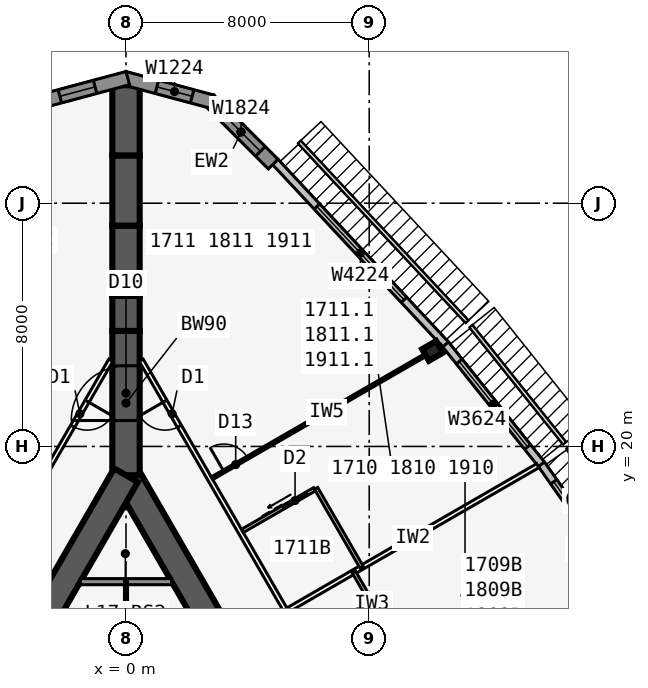
"""IFC4 building model, lengths in metres.
Left out: names, types, materials, properties, quantities, classifications, styles, units other than length and angle.
Written with IfcOpenShell. Run it as: python <this file> out.ifc"""

import sys

from ifc_helpers import new_model, si_unit, direction, frame, frame_2d, origin, origin_2d, place, context, subcontext, project, spatial, polyline, rectangle, i_section, outline, extrude, element, fill, save


model = new_model("IFC4")
c1 = context("Model", 3, precision=1e-05, world=origin(), true_north=direction((0.0, 1.0)))
c2 = subcontext(c1, "Body", "Model", "MODEL_VIEW")
j1 = project(units=[si_unit("LENGTHUNIT", "METRE"), si_unit("PLANEANGLEUNIT", "RADIAN")], contexts=[c1])
p1 = place(None, origin())
s1 = spatial("IfcSite", under=j1, at=p1, CompositionType="ELEMENT")
p2 = place(p1, origin())
s2 = spatial("IfcBuilding", under=s1, at=p2, CompositionType="ELEMENT")
p3 = place(p2, frame((0.0, 0.0, 69.3)))
s3 = spatial("IfcBuildingStorey", under=s2, at=p3, CompositionType="ELEMENT", Elevation=69.3)
p4 = place(p3, frame((16.5, -9.526, 0.0), z_axis=(0.0, 0.0, 1.0), x_axis=(-0.499999749417, 0.866025548458, 0.0)))
e1 = element("IfcWall", 1, at=p4, inside=s3, PredefinedType="SHEAR", context=c2, shape_type="SweptSolid", body=[
    extrude(rectangle(XDim=33.0, YDim=0.9, at=frame_2d((16.5, 0.0))), origin(), (0.0, 0.0, 1.0), 3.4),
])
p5 = place(p4, frame((14.15, 0.0, 0.0)))
e2 = element("IfcOpeningElement", 2, at=p5, cuts=e1, PredefinedType="OPENING", context=c2, shape_type="SweptSolid", body=[
    extrude(rectangle(XDim=1.8, YDim=2.13, at=frame_2d((0.9, 1.065))), frame((0.0, 0.46, 0.0), z_axis=(0.0, -1.0, 0.0), x_axis=(1.0, 0.0, 0.0)), (0.0, 0.0, 1.0), 0.92),
])
p6 = place(p4, frame((12.6, 0.0, 0.0)))
e3 = element("IfcOpeningElement", 3, at=p6, cuts=e1, PredefinedType="OPENING", context=c2, shape_type="SweptSolid", body=[
    extrude(rectangle(XDim=1.0, YDim=2.13, at=frame_2d((0.5, 1.065))), frame((0.0, 0.46, 0.0), z_axis=(0.0, -1.0, 0.0), x_axis=(1.0, 0.0, 0.0)), (0.0, 0.0, 1.0), 0.92),
])
p7 = place(p3, frame((0.0, 19.052, 0.0), z_axis=(0.0, 0.0, 1.0), x_axis=(-0.499999749417, -0.866025548458, 0.0)))
e4 = element("IfcWall", 4, at=p7, inside=s3, PredefinedType="SHEAR", context=c2, shape_type="SweptSolid", body=[
    extrude(rectangle(XDim=33.0, YDim=0.9, at=frame_2d((16.5, 0.0))), origin(), (0.0, 0.0, 1.0), 3.4),
])
p8 = place(p7, frame((14.15, 0.0, 0.0)))
e5 = element("IfcOpeningElement", 5, at=p8, cuts=e4, PredefinedType="OPENING", context=c2, shape_type="SweptSolid", body=[
    extrude(rectangle(XDim=1.8, YDim=2.13, at=frame_2d((0.9, 1.065))), frame((0.0, 0.46, 0.0), z_axis=(0.0, -1.0, 0.0), x_axis=(1.0, 0.0, 0.0)), (0.0, 0.0, 1.0), 0.92),
])
p9 = place(p7, frame((12.6, 0.0, 0.0)))
e6 = element("IfcOpeningElement", 6, at=p9, cuts=e4, PredefinedType="OPENING", context=c2, shape_type="SweptSolid", body=[
    extrude(rectangle(XDim=1.0, YDim=2.13, at=frame_2d((0.5, 1.065))), frame((0.0, 0.46, 0.0), z_axis=(0.0, -1.0, 0.0), x_axis=(1.0, 0.0, 0.0)), (0.0, 0.0, 1.0), 0.92),
])
p10 = place(p3, frame((0.0, 19.052, 0.0), z_axis=(0.0, 0.0, 1.0), x_axis=(0.0, 1.0, 0.0)))
e7 = element("IfcWall", 7, at=p10, inside=s3, PredefinedType="SHEAR", context=c2, shape_type="SweptSolid", body=[
    extrude(rectangle(XDim=4.746, YDim=0.9, at=frame_2d((2.373, 0.0))), origin(), (0.0, 0.0, 1.0), 3.4),
])
p11 = place(p10, frame((1.8, 0.0, 0.0)))
e8 = element("IfcOpeningElement", 8, at=p11, cuts=e7, PredefinedType="OPENING", context=c2, shape_type="SweptSolid", body=[
    extrude(rectangle(XDim=1.8, YDim=2.13, at=frame_2d((0.9, 1.065))), frame((0.0, 0.46, 0.0), z_axis=(0.0, -1.0, 0.0), x_axis=(1.0, 0.0, 0.0)), (0.0, 0.0, 1.0), 0.92),
])
p12 = place(p3, frame((0.0, 23.799, 0.0), z_axis=(0.0, 0.0, 1.0), x_axis=(0.0, 1.0, 0.0)))
e9 = element("IfcWall", 9, at=p12, inside=s3, PredefinedType="SHEAR", context=c2, shape_type="SweptSolid", body=[
    extrude(rectangle(XDim=1.155, YDim=0.9, at=frame_2d((0.577, 0.0))), origin(), (0.0, 0.0, 1.0), 3.4),
])
p13 = place(p3, frame((0.0, 24.953, 0.0), z_axis=(0.0, 0.0, 1.0), x_axis=(0.0, 1.0, 0.0)))
e10 = element("IfcWall", 10, at=p13, inside=s3, PredefinedType="SHEAR", context=c2, shape_type="SweptSolid", body=[
    extrude(rectangle(XDim=2.309, YDim=0.9, at=frame_2d((1.155, 0.0))), origin(), (0.0, 0.0, 1.0), 3.4),
])
p14 = place(p3, frame((0.0, 27.263, 0.0), z_axis=(0.0, 0.0, 1.0), x_axis=(0.0, 1.0, 0.0)))
e11 = element("IfcWall", 11, at=p14, inside=s3, PredefinedType="SHEAR", context=c2, shape_type="SweptSolid", body=[
    extrude(rectangle(XDim=2.31, YDim=0.9, at=frame_2d((1.155, 0.0))), origin(), (0.0, 0.0, 1.0), 3.4),
])
p15 = place(p3, frame((0.0, 29.572, 0.0), z_axis=(0.0, 0.0, 1.0), x_axis=(0.0, 1.0, 0.0)))
e12 = element("IfcWall", 12, at=p15, inside=s3, PredefinedType="SHEAR", context=c2, shape_type="SweptSolid", body=[
    extrude(rectangle(XDim=2.309, YDim=0.9, at=frame_2d((1.155, 0.0))), origin(), (0.0, 0.0, 1.0), 3.4),
])
p16 = place(p3, frame((10.083, 23.142, 0.0), z_axis=(0.0, 0.0, 1.0), x_axis=(-0.5, 0.866025403784, 0.0)))
e13 = element("IfcColumn", 13, at=p16, inside=s3, PredefinedType="COLUMN", context=c2, shape_type="SweptSolid", body=[
    extrude(i_section(OverallWidth=0.442, OverallDepth=0.531, WebThickness=0.066, FlangeThickness=0.106, at=origin_2d()), origin(), (0.0, 0.0, 1.0), 3.4),
])
p17 = place(p3, frame((16.555, 15.318, 0.0), z_axis=(0.0, 0.0, 1.0), x_axis=(-0.5766431066, 0.81699616132, 0.0)))
e14 = element("IfcWall", 14, at=p17, inside=s3, PredefinedType="STANDARD", context=c2, shape_type="SweptSolid", body=[
    extrude(rectangle(XDim=5.021, YDim=0.25, at=frame_2d((2.51, 0.0))), origin(), (0.0, 0.0, 1.0), 3.235),
])
p18 = place(p17, frame((0.71, 0.0, 0.45)))
e15 = element("IfcOpeningElement", 15, at=p18, cuts=e14, PredefinedType="OPENING", context=c2, shape_type="SweptSolid", body=[
    extrude(rectangle(XDim=3.6, YDim=2.4, at=frame_2d((1.8, 1.2))), frame((0.0, 0.135, 0.0), z_axis=(0.0, -1.0, 0.0), x_axis=(1.0, 0.0, 0.0)), (0.0, 0.0, 1.0), 0.27),
])
p19 = place(p3, frame((13.664, 19.414, 0.0), z_axis=(0.0, 0.0, 1.0), x_axis=(-0.624594965756, 0.780948864364, 0.0)))
e16 = element("IfcWall", 16, at=p19, inside=s3, PredefinedType="STANDARD", context=c2, shape_type="SweptSolid", body=[
    extrude(rectangle(XDim=5.058, YDim=0.25, at=frame_2d((2.529, 0.0))), origin(), (0.0, 0.0, 1.0), 3.235),
])
p20 = place(p19, frame((0.729, 0.0, 0.45)))
e17 = element("IfcOpeningElement", 17, at=p20, cuts=e16, PredefinedType="OPENING", context=c2, shape_type="SweptSolid", body=[
    extrude(rectangle(XDim=3.6, YDim=2.4, at=frame_2d((1.8, 1.2))), frame((0.0, 0.135, 0.0), z_axis=(0.0, -1.0, 0.0), x_axis=(1.0, 0.0, 0.0)), (0.0, 0.0, 1.0), 0.27),
])
p21 = place(p3, frame((10.511, 23.357, 0.0), z_axis=(0.0, 0.0, 1.0), x_axis=(-0.682289646561, 0.731081964075, 0.0)))
e18 = element("IfcWall", 18, at=p21, inside=s3, PredefinedType="STANDARD", context=c2, shape_type="SweptSolid", body=[
    extrude(rectangle(XDim=8.211, YDim=0.25, at=frame_2d((4.105, 0.0))), origin(), (0.0, 0.0, 1.0), 3.235),
])
p22 = place(p21, frame((2.006, 0.0, 0.45)))
e19 = element("IfcOpeningElement", 19, at=p22, cuts=e18, PredefinedType="OPENING", context=c2, shape_type="SweptSolid", body=[
    extrude(rectangle(XDim=4.2, YDim=2.4, at=frame_2d((2.1, 1.2))), frame((0.0, 0.135, 0.0), z_axis=(0.0, -1.0, 0.0), x_axis=(1.0, 0.0, 0.0)), (0.0, 0.0, 1.0), 0.27),
])
p23 = place(p3, frame((4.841, 29.286, 0.0), z_axis=(0.0, 0.0, 1.0), x_axis=(-0.707106781187, 0.707106781187, 0.0)))
e20 = element("IfcWall", 20, at=p23, inside=s3, PredefinedType="SOLIDWALL", context=c2, shape_type="SweptSolid", body=[
    extrude(rectangle(XDim=2.988, YDim=0.45, at=frame_2d((1.494, 0.0))), origin(), (0.0, 0.0, 1.0), 3.235),
])
p24 = place(p23, frame((0.594, 0.0, 0.45)))
e21 = element("IfcOpeningElement", 21, at=p24, cuts=e20, PredefinedType="OPENING", context=c2, shape_type="SweptSolid", body=[
    extrude(rectangle(XDim=1.8, YDim=2.4, at=frame_2d((0.9, 1.2))), frame((0.0, 0.235, 0.0), z_axis=(0.0, -1.0, 0.0), x_axis=(1.0, 0.0, 0.0)), (0.0, 0.0, 1.0), 0.47),
])
p25 = place(p3, frame((2.829, 31.341, 0.0), z_axis=(0.0, 0.0, 1.0), x_axis=(-0.965930548995, 0.258801419081, 0.0)))
e22 = element("IfcWall", 22, at=p25, inside=s3, PredefinedType="SOLIDWALL", context=c2, shape_type="SweptSolid", body=[
    extrude(outline(polyline([(2.989, 0.225), (2.929, 0.225), (2.438, 0.093), (2.402, 0.225), (0.0, 0.225), (0.0, -0.225), (2.989, -0.225), (2.989, 0.225)])), origin(), (0.0, 0.0, 1.0), 3.235),
])
p26 = place(p25, frame((0.676, 0.0, 0.45)))
e23 = element("IfcOpeningElement", 23, at=p26, cuts=e22, PredefinedType="OPENING", context=c2, shape_type="SweptSolid", body=[
    extrude(rectangle(XDim=1.2, YDim=2.4, at=frame_2d((0.6, 1.2))), frame((0.0, 0.235, 0.0), z_axis=(0.0, -1.0, 0.0), x_axis=(1.0, 0.0, 0.0)), (0.0, 0.0, 1.0), 0.47),
])
p27 = place(p3, frame((0.058, 32.114, 0.0), z_axis=(0.0, 0.0, 1.0), x_axis=(-0.965930548995, -0.258801419081, 0.0)))
e24 = element("IfcWall", 24, at=p27, inside=s3, PredefinedType="SOLIDWALL", context=c2, shape_type="SweptSolid", body=[
    extrude(outline(polyline([(2.989, 0.225), (0.586, 0.225), (0.551, 0.093), (0.059, 0.225), (0.0, 0.225), (0.0, -0.225), (2.989, -0.225), (2.989, 0.225)])), origin(), (0.0, 0.0, 1.0), 3.235),
])
p28 = place(p27, frame((1.113, 0.0, 0.45)))
e25 = element("IfcOpeningElement", 25, at=p28, cuts=e24, PredefinedType="OPENING", context=c2, shape_type="SweptSolid", body=[
    extrude(rectangle(XDim=1.2, YDim=2.4, at=frame_2d((0.6, 1.2))), frame((0.0, 0.235, 0.0), z_axis=(0.0, -1.0, 0.0), x_axis=(1.0, 0.0, 0.0)), (0.0, 0.0, 1.0), 0.47),
])
p29 = place(p3, frame((20.027, -10.985, 0.0), z_axis=(0.0, 0.0, 1.0), x_axis=(-0.500001677587, 0.866024435227, 0.0)))
e26 = element("IfcWall", 26, at=p29, inside=s3, PredefinedType="PARTITIONING", context=c2, shape_type="SweptSolid", body=[
    extrude(rectangle(XDim=39.054, YDim=0.15, at=frame_2d((19.527, 0.0))), origin(), (0.0, 0.0, 1.0), 3.235),
])
p30 = place(p29, frame((0.352, 0.0, 0.0)))
e27 = element("IfcOpeningElement", 27, at=p30, cuts=e26, PredefinedType="OPENING", context=c2, shape_type="SweptSolid", body=[
    extrude(rectangle(XDim=0.95, YDim=2.13, at=frame_2d((0.475, 1.065))), frame((0.0, 0.085, 0.0), z_axis=(0.0, -1.0, 0.0), x_axis=(1.0, 0.0, 0.0)), (0.0, 0.0, 1.0), 0.17),
])
p31 = place(p29, frame((6.552, 0.0, 0.0)))
e28 = element("IfcOpeningElement", 28, at=p31, cuts=e26, PredefinedType="OPENING", context=c2, shape_type="SweptSolid", body=[
    extrude(rectangle(XDim=0.95, YDim=2.13, at=frame_2d((0.475, 1.065))), frame((0.0, 0.085, 0.0), z_axis=(0.0, -1.0, 0.0), x_axis=(1.0, 0.0, 0.0)), (0.0, 0.0, 1.0), 0.17),
])
p32 = place(p29, frame((16.552, 0.0, 0.0)))
e29 = element("IfcOpeningElement", 29, at=p32, cuts=e26, PredefinedType="OPENING", context=c2, shape_type="SweptSolid", body=[
    extrude(rectangle(XDim=0.95, YDim=2.13, at=frame_2d((0.475, 1.065))), frame((0.0, 0.085, 0.0), z_axis=(0.0, -1.0, 0.0), x_axis=(1.0, 0.0, 0.0)), (0.0, 0.0, 1.0), 0.17),
])
p33 = place(p29, frame((25.952, 0.0, 0.0)))
e30 = element("IfcOpeningElement", 30, at=p33, cuts=e26, PredefinedType="OPENING", context=c2, shape_type="SweptSolid", body=[
    extrude(rectangle(XDim=0.95, YDim=2.13, at=frame_2d((0.475, 1.065))), frame((0.0, 0.085, 0.0), z_axis=(0.0, -1.0, 0.0), x_axis=(1.0, 0.0, 0.0)), (0.0, 0.0, 1.0), 0.17),
])
p34 = place(p29, frame((36.546, 0.0, 0.0)))
e31 = element("IfcOpeningElement", 31, at=p34, cuts=e26, PredefinedType="OPENING", context=c2, shape_type="SweptSolid", body=[
    extrude(rectangle(XDim=0.95, YDim=2.13, at=frame_2d((0.475, 1.065))), frame((0.0, 0.085, 0.0), z_axis=(0.0, -1.0, 0.0), x_axis=(1.0, 0.0, 0.0)), (0.0, 0.0, 1.0), 0.17),
])
p35 = place(p3, frame((7.829, 10.293, 0.0), z_axis=(0.0, 0.0, 1.0), x_axis=(0.866016302457, 0.50001576363, 0.0)))
e32 = element("IfcWall", 32, at=p35, inside=s3, PredefinedType="PARTITIONING", context=c2, shape_type="SweptSolid", body=[
    extrude(rectangle(XDim=9.943, YDim=0.15, at=frame_2d((4.972, 0.0))), origin(), (0.0, 0.0, 1.0), 2.389),
])
p36 = place(p3, frame((5.329, 14.623, 0.0), z_axis=(0.0, 0.0, 1.0), x_axis=(0.866018409083, 0.500012114982, 0.0)))
e33 = element("IfcWall", 33, at=p36, inside=s3, PredefinedType="PARTITIONING", context=c2, shape_type="SweptSolid", body=[
    extrude(rectangle(XDim=9.485, YDim=0.15, at=frame_2d((4.742, 0.0))), origin(), (0.0, 0.0, 1.0), 2.389),
])
p37 = place(p3, frame((2.829, 18.954, 0.0), z_axis=(0.0, 0.0, 1.0), x_axis=(0.866020536561, 0.500008430184, 0.0)))
e34 = element("IfcWall", 34, at=p37, inside=s3, PredefinedType="PARTITIONING", context=c2, shape_type="SweptSolid", body=[
    extrude(rectangle(XDim=8.72, YDim=0.1, at=frame_2d((4.36, 0.0))), origin(), (0.0, 0.0, 1.0), 2.389),
])
p38 = place(p37, frame((0.45, 0.0, 0.0)))
e35 = element("IfcOpeningElement", 35, at=p38, cuts=e34, PredefinedType="OPENING", context=c2, shape_type="SweptSolid", body=[
    extrude(rectangle(XDim=0.9, YDim=2.13, at=frame_2d((0.45, 1.065))), frame((0.0, 0.06, 0.0), z_axis=(0.0, -1.0, 0.0), x_axis=(1.0, 0.0, 0.0)), (0.0, 0.0, 1.0), 0.12),
])
p39 = place(p3, frame((8.694, 13.795, 0.0), z_axis=(0.0, 0.0, 1.0), x_axis=(-0.500077600433, 0.865980596518, 0.0)))
e36 = element("IfcWall", 36, at=p39, inside=s3, PredefinedType="PLUMBINGWALL", context=c2, shape_type="SweptSolid", body=[
    extrude(rectangle(XDim=2.4, YDim=0.12, at=frame_2d((1.2, 0.0))), origin(), (0.0, 0.0, 1.0), 3.235),
])
p40 = place(p3, frame((7.753, 16.023, 0.0), z_axis=(0.0, 0.0, 1.0), x_axis=(-0.499990139034, 0.866031096941, 0.0)))
e37 = element("IfcWall", 37, at=p40, inside=s3, PredefinedType="PLUMBINGWALL", context=c2, shape_type="SweptSolid", body=[
    extrude(rectangle(XDim=3.0, YDim=0.12, at=frame_2d((1.5, 0.0))), origin(), (0.0, 0.0, 1.0), 3.235),
])
p41 = place(p3, frame((3.829, 17.221, 0.0), z_axis=(0.0, 0.0, 1.0), x_axis=(0.865997131366, 0.500048966069, 0.0)))
e38 = element("IfcWall", 38, at=p41, inside=s3, PredefinedType="PLUMBINGWALL", context=c2, shape_type="SweptSolid", body=[
    extrude(rectangle(XDim=2.74, YDim=0.12, at=frame_2d((1.37, 0.0))), origin(), (0.0, 0.0, 1.0), 3.235),
])
p42 = place(p41, frame((1.55, 0.0, 0.0)))
e39 = element("IfcOpeningElement", 39, at=p42, cuts=e38, PredefinedType="OPENING", context=c2, shape_type="SweptSolid", body=[
    extrude(rectangle(XDim=0.9, YDim=2.13, at=frame_2d((0.45, 1.065))), frame((0.0, 0.07, 0.0), z_axis=(0.0, -1.0, 0.0), x_axis=(1.0, 0.0, 0.0)), (0.0, 0.0, 1.0), 0.14),
])
p43 = place(p3, frame((-0.5, 22.836, 0.0), z_axis=(0.0, 0.0, 1.0), x_axis=(-0.500001677587, -0.866024435227, 0.0)))
e40 = element("IfcWall", 40, at=p43, inside=s3, PredefinedType="PARTITIONING", context=c2, shape_type="SweptSolid", body=[
    extrude(rectangle(XDim=39.054, YDim=0.15, at=frame_2d((19.527, 0.0))), origin(), (0.0, 0.0, 1.0), 3.235),
])
p44 = place(p43, frame((1.558, 0.0, 0.0)))
e41 = element("IfcOpeningElement", 41, at=p44, cuts=e40, PredefinedType="OPENING", context=c2, shape_type="SweptSolid", body=[
    extrude(rectangle(XDim=0.95, YDim=2.13, at=frame_2d((0.475, 1.065))), frame((0.0, 0.085, 0.0), z_axis=(0.0, -1.0, 0.0), x_axis=(1.0, 0.0, 0.0)), (0.0, 0.0, 1.0), 0.17),
])
p45 = place(p43, frame((11.552, 0.0, 0.0)))
e42 = element("IfcOpeningElement", 42, at=p45, cuts=e40, PredefinedType="OPENING", context=c2, shape_type="SweptSolid", body=[
    extrude(rectangle(XDim=0.95, YDim=2.13, at=frame_2d((0.475, 1.065))), frame((0.0, 0.085, 0.0), z_axis=(0.0, -1.0, 0.0), x_axis=(1.0, 0.0, 0.0)), (0.0, 0.0, 1.0), 0.17),
])
p46 = place(p43, frame((20.952, 0.0, 0.0)))
e43 = element("IfcOpeningElement", 43, at=p46, cuts=e40, PredefinedType="OPENING", context=c2, shape_type="SweptSolid", body=[
    extrude(rectangle(XDim=0.95, YDim=2.13, at=frame_2d((0.475, 1.065))), frame((0.0, 0.085, 0.0), z_axis=(0.0, -1.0, 0.0), x_axis=(1.0, 0.0, 0.0)), (0.0, 0.0, 1.0), 0.17),
])
p47 = place(p43, frame((27.752, 0.0, 0.0)))
e44 = element("IfcOpeningElement", 44, at=p47, cuts=e40, PredefinedType="OPENING", context=c2, shape_type="SweptSolid", body=[
    extrude(rectangle(XDim=0.95, YDim=2.13, at=frame_2d((0.475, 1.065))), frame((0.0, 0.085, 0.0), z_axis=(0.0, -1.0, 0.0), x_axis=(1.0, 0.0, 0.0)), (0.0, 0.0, 1.0), 0.17),
])
p48 = place(p43, frame((36.546, 0.0, 0.0)))
e45 = element("IfcOpeningElement", 45, at=p48, cuts=e40, PredefinedType="OPENING", context=c2, shape_type="SweptSolid", body=[
    extrude(rectangle(XDim=0.95, YDim=2.13, at=frame_2d((0.475, 1.065))), frame((0.0, 0.085, 0.0), z_axis=(0.0, -1.0, 0.0), x_axis=(1.0, 0.0, 0.0)), (0.0, 0.0, 1.0), 0.17),
])
p49 = place(p3, frame((-1.501, 15.552, 0.0), z_axis=(0.0, 0.0, 1.0), x_axis=(1.0, 0.0, 0.0)))
e46 = element("IfcWall", 46, at=p49, inside=s3, PredefinedType="SOLIDWALL", context=c2, shape_type="SweptSolid", body=[
    extrude(rectangle(XDim=3.002, YDim=0.2, at=frame_2d((1.501, 0.0))), origin(), (0.0, 0.0, 1.0), 3.235),
])
p50 = place(p3, frame((0.0, 15.552, 0.0), z_axis=(0.0, 0.0, 1.0), x_axis=(0.0, -1.0, 0.0)))
e47 = element("IfcWall", 47, at=p50, inside=s3, PredefinedType="PARTITIONING", context=c2, shape_type="SweptSolid", body=[
    extrude(rectangle(XDim=3.775, YDim=0.1, at=frame_2d((1.888, 0.0))), origin(), (0.0, 0.0, 1.0), 3.235),
])
p51 = place(p50, frame((1.815, 0.0, 0.0)))
e48 = element("IfcOpeningElement", 48, at=p51, cuts=e47, PredefinedType="OPENING", context=c2, shape_type="SweptSolid", body=[
    extrude(rectangle(XDim=0.9, YDim=2.13, at=frame_2d((0.45, 1.065))), frame((0.0, 0.06, 0.0), z_axis=(0.0, -1.0, 0.0), x_axis=(1.0, 0.0, 0.0)), (0.0, 0.0, 1.0), 0.12),
])
p52 = place(p18, origin())
e49 = element("IfcWindow", 49, at=p52, inside=s3, PartitioningType="SINGLE_PANEL", PredefinedType="WINDOW", context=c2, shape_type="SweptSolid", body=[
    extrude(rectangle(XDim=3.6, YDim=2.4, at=frame_2d((1.8, 1.2))), frame((0.0, 0.03, 0.0), z_axis=(0.0, -1.0, 0.0), x_axis=(1.0, 0.0, 0.0)), (0.0, 0.0, 1.0), 0.06),
])
fill(e15, e49)
p53 = place(p20, origin())
e50 = element("IfcWindow", 50, at=p53, inside=s3, PartitioningType="SINGLE_PANEL", PredefinedType="WINDOW", context=c2, shape_type="SweptSolid", body=[
    extrude(rectangle(XDim=3.6, YDim=2.4, at=frame_2d((1.8, 1.2))), frame((0.0, 0.03, 0.0), z_axis=(0.0, -1.0, 0.0), x_axis=(1.0, 0.0, 0.0)), (0.0, 0.0, 1.0), 0.06),
])
fill(e17, e50)
p54 = place(p22, origin())
e51 = element("IfcWindow", 51, at=p54, inside=s3, PartitioningType="SINGLE_PANEL", PredefinedType="WINDOW", context=c2, shape_type="SweptSolid", body=[
    extrude(rectangle(XDim=4.2, YDim=2.4, at=frame_2d((2.1, 1.2))), frame((0.0, 0.03, 0.0), z_axis=(0.0, -1.0, 0.0), x_axis=(1.0, 0.0, 0.0)), (0.0, 0.0, 1.0), 0.06),
])
fill(e19, e51)
p55 = place(p24, origin())
e52 = element("IfcWindow", 52, at=p55, inside=s3, PartitioningType="SINGLE_PANEL", PredefinedType="WINDOW", context=c2, shape_type="SweptSolid", body=[
    extrude(rectangle(XDim=1.8, YDim=2.4, at=frame_2d((0.9, 1.2))), frame((0.0, 0.03, 0.0), z_axis=(0.0, -1.0, 0.0), x_axis=(1.0, 0.0, 0.0)), (0.0, 0.0, 1.0), 0.06),
])
fill(e21, e52)
p56 = place(p26, origin())
e53 = element("IfcWindow", 53, at=p56, inside=s3, PartitioningType="SINGLE_PANEL", PredefinedType="WINDOW", context=c2, shape_type="SweptSolid", body=[
    extrude(rectangle(XDim=1.2, YDim=2.4, at=frame_2d((0.6, 1.2))), frame((0.0, 0.03, 0.0), z_axis=(0.0, -1.0, 0.0), x_axis=(1.0, 0.0, 0.0)), (0.0, 0.0, 1.0), 0.06),
])
fill(e23, e53)
p57 = place(p28, origin())
e54 = element("IfcWindow", 54, at=p57, inside=s3, PartitioningType="SINGLE_PANEL", PredefinedType="WINDOW", context=c2, shape_type="SweptSolid", body=[
    extrude(rectangle(XDim=1.2, YDim=2.4, at=frame_2d((0.6, 1.2))), frame((0.0, 0.03, 0.0), z_axis=(0.0, -1.0, 0.0), x_axis=(1.0, 0.0, 0.0)), (0.0, 0.0, 1.0), 0.06),
])
fill(e25, e54)
p58 = place(p38, origin())
e55 = element("IfcDoor", 55, at=p58, inside=s3, OperationType="SINGLE_SWING_LEFT", PredefinedType="DOOR", context=c2, shape_type="SweptSolid", body=[
    extrude(rectangle(XDim=0.9, YDim=2.13, at=frame_2d((0.45, 1.065))), frame((0.0, 0.025, 0.0), z_axis=(0.0, -1.0, 0.0), x_axis=(1.0, 0.0, 0.0)), (0.0, 0.0, 1.0), 0.05),
])
fill(e35, e55)
p59 = place(p42, origin())
e56 = element("IfcDoor", 56, at=p59, inside=s3, OperationType="SLIDING_TO_LEFT", PredefinedType="DOOR", context=c2, shape_type="SweptSolid", body=[
    extrude(rectangle(XDim=0.9, YDim=2.13, at=frame_2d((0.45, 1.065))), frame((0.0, 0.025, 0.0), z_axis=(0.0, -1.0, 0.0), x_axis=(1.0, 0.0, 0.0)), (0.0, 0.0, 1.0), 0.05),
])
fill(e39, e56)
p60 = place(p34, origin())
e57 = element("IfcDoor", 57, at=p60, inside=s3, OperationType="SINGLE_SWING_RIGHT", PredefinedType="DOOR", context=c2, shape_type="SweptSolid", body=[
    extrude(rectangle(XDim=0.95, YDim=2.13, at=frame_2d((0.475, 1.065))), frame((0.0, 0.025, 0.0), z_axis=(0.0, -1.0, 0.0), x_axis=(1.0, 0.0, 0.0)), (0.0, 0.0, 1.0), 0.05),
])
fill(e31, e57)
p61 = place(p44, origin())
e58 = element("IfcDoor", 58, at=p61, inside=s3, OperationType="SINGLE_SWING_LEFT", PredefinedType="DOOR", context=c2, shape_type="SweptSolid", body=[
    extrude(rectangle(XDim=0.95, YDim=2.13, at=frame_2d((0.475, 1.065))), frame((0.0, 0.025, 0.0), z_axis=(0.0, -1.0, 0.0), x_axis=(1.0, 0.0, 0.0)), (0.0, 0.0, 1.0), 0.05),
])
fill(e41, e58)
p62 = place(p11, origin())
e59 = element("IfcDoor", 59, at=p62, inside=s3, OperationType="DOUBLE_DOOR_DOUBLE_SWING", PredefinedType="DOOR", context=c2, shape_type="SweptSolid", body=[
    extrude(rectangle(XDim=1.8, YDim=2.13, at=frame_2d((0.9, 1.065))), frame((0.0, 0.025, 0.0), z_axis=(0.0, -1.0, 0.0), x_axis=(1.0, 0.0, 0.0)), (0.0, 0.0, 1.0), 0.05),
])
fill(e8, e59)
save(model, sys.argv[1])
